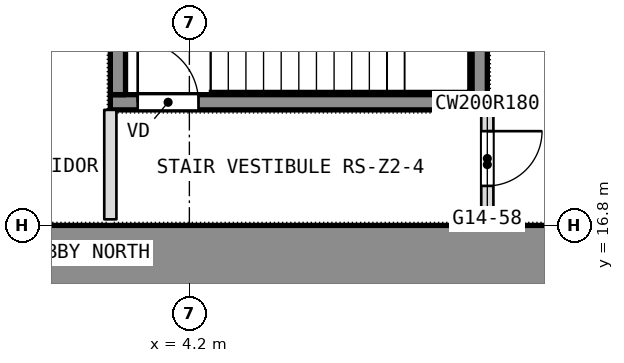
"""IFC4 building model, lengths in metres.
Left out: names, types, materials, properties, quantities, classifications, styles, units other than length and angle.
Written with IfcOpenShell. Run it as: python <this file> out.ifc"""

import sys

from ifc_helpers import new_model, si_unit, direction, frame, frame_2d, origin, place, context, subcontext, project, spatial, rectangle, extrude, element, fill, save


model = new_model("IFC4")
c1 = context("Model", 3, precision=1e-05, world=origin(), true_north=direction((0.0, 1.0)))
c2 = subcontext(c1, "Body", "Model", "MODEL_VIEW")
j1 = project(units=[si_unit("LENGTHUNIT", "METRE"), si_unit("PLANEANGLEUNIT", "RADIAN")], contexts=[c1])
p1 = place(None, origin())
s1 = spatial("IfcSite", under=j1, at=p1, CompositionType="ELEMENT")
p2 = place(p1, origin())
s2 = spatial("IfcBuilding", under=s1, at=p2, CompositionType="ELEMENT")
p3 = place(p2, frame((0.0, 0.0, 162.5)))
s3 = spatial("IfcBuildingStorey", under=s2, at=p3, CompositionType="ELEMENT", Elevation=162.5)
p4 = place(p3, frame((-11.1, 16.3, 0.0), z_axis=(0.0, 0.0, 1.0), x_axis=(1.0, 0.0, 0.0)))
e1 = element("IfcWall", 1, at=p4, inside=s3, PredefinedType="SHEAR", context=c2, shape_type="SweptSolid", body=[
    extrude(rectangle(XDim=22.2, YDim=1.0, at=frame_2d((11.1, 0.0))), origin(), (0.0, 0.0, 1.0), 3.6),
])
p5 = place(p3, frame((9.1, 16.9, 0.0), z_axis=(0.0, 0.0, 1.0), x_axis=(0.0, 1.0, 0.0)))
e2 = element("IfcWall", 2, at=p5, inside=s3, PredefinedType="PARTITIONING", context=c2, shape_type="SweptSolid", body=[
    extrude(rectangle(XDim=1.8, YDim=0.2, at=frame_2d((0.9, 0.0))), origin(), (0.0, 0.0, 1.0), 3.34),
])
p6 = place(p5, frame((0.55, 0.0, 0.0)))
e3 = element("IfcOpeningElement", 3, at=p6, cuts=e2, PredefinedType="OPENING", context=c2, shape_type="SweptSolid", body=[
    extrude(rectangle(XDim=0.9, YDim=2.1, at=frame_2d((0.45, 1.05))), frame((0.0, 0.1, 0.0), z_axis=(0.0, -1.0, 0.0), x_axis=(1.0, 0.0, 0.0)), (0.0, 0.0, 1.0), 0.2),
])
p7 = place(p3, frame((2.9, 16.9, 0.0), z_axis=(0.0, 0.0, 1.0), x_axis=(0.0, 1.0, 0.0)))
e4 = element("IfcWall", 4, at=p7, inside=s3, PredefinedType="PARTITIONING", context=c2, shape_type="SweptSolid", body=[
    extrude(rectangle(XDim=1.8, YDim=0.2, at=frame_2d((0.9, 0.0))), origin(), (0.0, 0.0, 1.0), 3.34),
])
p8 = place(p3, frame((2.9, 18.825, 0.1), z_axis=(0.0, 0.0, 1.0), x_axis=(1.0, 0.0, 0.0)))
e5 = element("IfcWall", 5, at=p8, inside=s3, PredefinedType="SHEAR", context=c2, shape_type="SweptSolid", body=[
    extrude(rectangle(XDim=6.2, YDim=0.25, at=frame_2d((3.1, 0.0))), origin(), (0.0, 0.0, 1.0), 3.6),
])
p9 = place(p8, frame((0.45, 0.0, 0.0)))
e6 = element("IfcOpeningElement", 6, at=p9, cuts=e5, PredefinedType="OPENING", context=c2, shape_type="SweptSolid", body=[
    extrude(rectangle(XDim=1.0, YDim=2.1, at=frame_2d((0.5, 1.05))), frame((0.0, 0.125, 0.0), z_axis=(0.0, -1.0, 0.0), x_axis=(1.0, 0.0, 0.0)), (0.0, 0.0, 1.0), 0.25),
])
for number, where, z_axis, x_axis in (
    (7, (3.025, 18.95, 0.1), (0.0, 0.0, 1.0), (0.0, 1.0, 0.0)),
    (8, (8.975, 18.95, 0.1), (0.0, 0.0, 1.0), (0.0, 1.0, 0.0)),
):
    element("IfcWall", number, at=place(p3, frame(where, z_axis=z_axis, x_axis=x_axis)), inside=s3, PredefinedType="SHEAR", context=c2, shape_type="SweptSolid", body=[
        extrude(rectangle(XDim=2.9, YDim=0.25, at=frame_2d((1.45, 0.0))), origin(), (0.0, 0.0, 1.0), 3.6),
    ])
p10 = place(p6, origin())
e9 = element("IfcDoor", 9, at=p10, inside=s3, OperationType="SINGLE_SWING_RIGHT", PredefinedType="DOOR", context=c2, shape_type="SweptSolid", body=[
    extrude(rectangle(XDim=0.9, YDim=2.1, at=frame_2d((0.45, 1.05))), frame((0.0, 0.025, 0.0), z_axis=(0.0, -1.0, 0.0), x_axis=(1.0, 0.0, 0.0)), (0.0, 0.0, 1.0), 0.05),
])
fill(e3, e9)
p11 = place(p9, origin())
e10 = element("IfcDoor", 10, at=p11, inside=s3, OperationType="SINGLE_SWING_LEFT", PredefinedType="DOOR", context=c2, shape_type="SweptSolid", body=[
    extrude(rectangle(XDim=1.0, YDim=2.1, at=frame_2d((0.5, 1.05))), frame((0.0, 0.025, 0.0), z_axis=(0.0, -1.0, 0.0), x_axis=(1.0, 0.0, 0.0)), (0.0, 0.0, 1.0), 0.05),
])
fill(e6, e10)
save(model, sys.argv[1])
